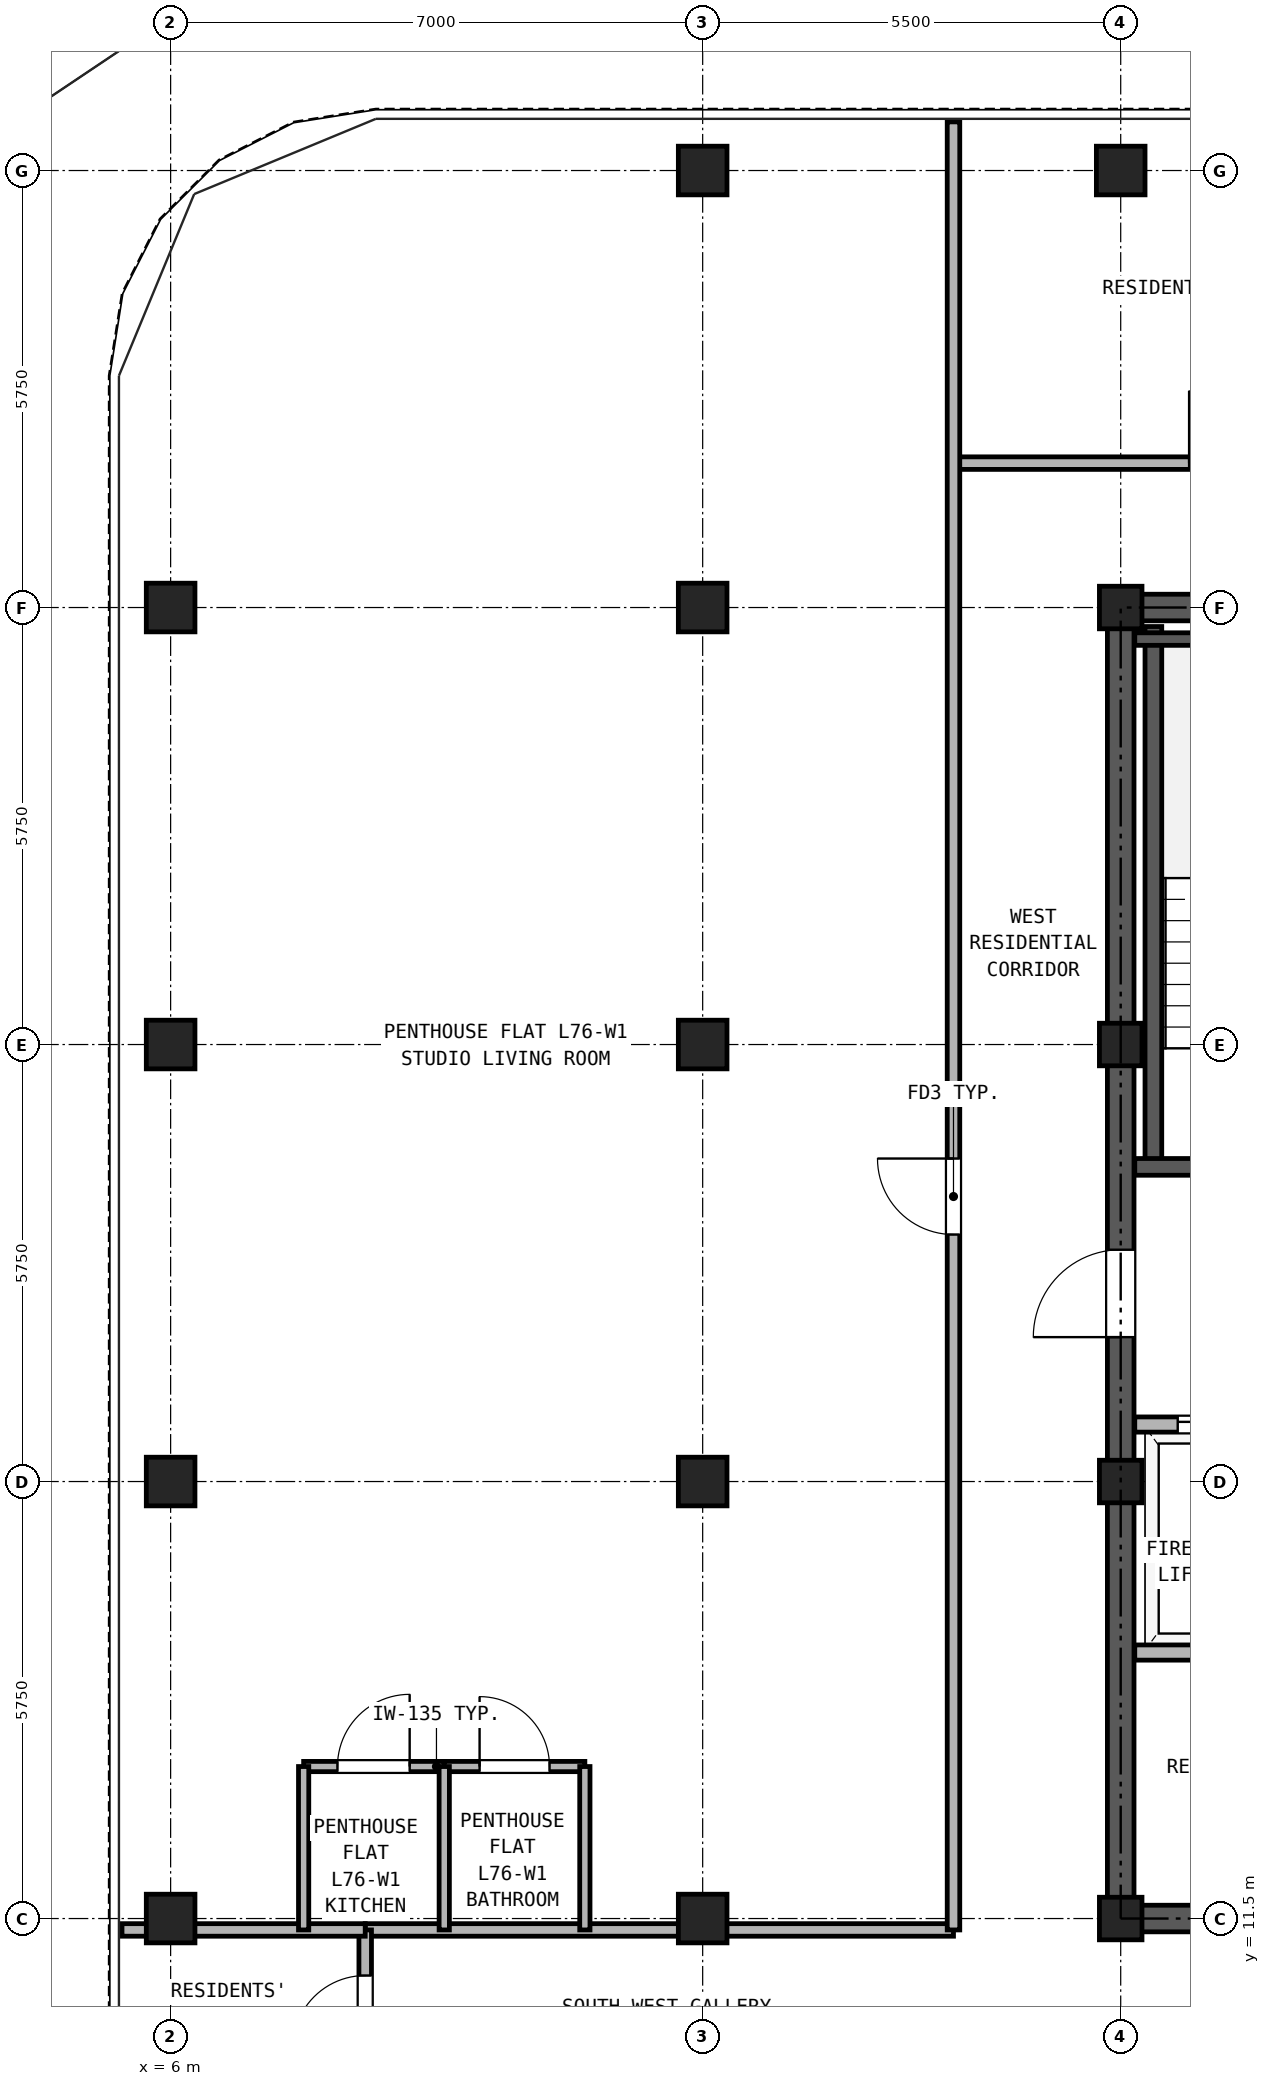
"""IFC4 building model, lengths in metres.
Left out: names, types, materials, properties, quantities, classifications, styles, units other than length and angle.
Written with IfcOpenShell. Run it as: python <this file> out.ifc"""

import sys

from ifc_helpers import new_model, si_unit, direction, frame, frame_2d, origin, origin_2d, place, context, subcontext, project, spatial, rectangle, hollow_rectangle, extrude, source, transform, mapped, element, fill, save


model = new_model("IFC4")
c1 = context("Model", 3, precision=1e-05, world=origin(), true_north=direction((0.0, 1.0)))
c2 = subcontext(c1, "Body", "Model", "MODEL_VIEW")
j1 = project(units=[si_unit("LENGTHUNIT", "METRE"), si_unit("PLANEANGLEUNIT", "RADIAN")], contexts=[c1])
p1 = place(None, origin())
s1 = spatial("IfcSite", under=j1, at=p1, CompositionType="ELEMENT")
p2 = place(p1, origin())
s2 = spatial("IfcBuilding", under=s1, at=p2, CompositionType="ELEMENT")
p3 = place(p2, frame((0.0, 0.0, 264.9)))
s3 = spatial("IfcBuildingStorey", under=s2, at=p3, CompositionType="ELEMENT", Elevation=264.9)
m1 = source(origin(), c2, "Body", "SweptSolid", [
    extrude(hollow_rectangle(XDim=0.64, YDim=0.64, WallThickness=0.035, at=origin_2d()), origin(), (0.0, 0.0, 1.0), 2.98),
])
for number, where, z_axis, x_axis in (
    (1, (13.0, 34.5, 0.0), (0.0, 0.0, 1.0), (1.0, 0.0, 0.0)),
    (2, (18.5, 34.5, 0.0), (0.0, 0.0, 1.0), (1.0, 0.0, 0.0)),
    (3, (6.0, 11.5, 0.0), (0.0, 0.0, 1.0), (1.0, 0.0, 0.0)),
    (4, (6.0, 17.25, 0.0), (0.0, 0.0, 1.0), (1.0, 0.0, 0.0)),
    (5, (6.0, 23.0, 0.0), (0.0, 0.0, 1.0), (1.0, 0.0, 0.0)),
    (6, (6.0, 28.75, 0.0), (0.0, 0.0, 1.0), (1.0, 0.0, 0.0)),
    (7, (13.0, 11.5, 0.0), (0.0, 0.0, 1.0), (1.0, 0.0, 0.0)),
    (8, (13.0, 17.25, 0.0), (0.0, 0.0, 1.0), (1.0, 0.0, 0.0)),
    (9, (13.0, 23.0, 0.0), (0.0, 0.0, 1.0), (1.0, 0.0, 0.0)),
    (10, (13.0, 28.75, 0.0), (0.0, 0.0, 1.0), (1.0, 0.0, 0.0)),
):
    element("IfcColumn", number, at=place(p3, frame(where, z_axis=z_axis, x_axis=x_axis)), inside=s3, PredefinedType="COLUMN", context=c2, shape_type="MappedRepresentation", body=[
        mapped(m1, transform((0.0, 0.0, 0.0), x_axis=(1.0, 0.0, 0.0), y_axis=(0.0, 1.0, 0.0), z_axis=(0.0, 0.0, 1.0), scale=1.0)),
    ])
m2 = source(origin(), c2, "Body", "SweptSolid", [
    extrude(hollow_rectangle(XDim=0.56, YDim=0.56, WallThickness=0.03, at=origin_2d()), origin(), (0.0, 0.0, 1.0), 2.98),
])
for number, where, z_axis, x_axis in (
    (11, (18.5, 11.5, 0.0), (0.0, 0.0, 1.0), (1.0, 0.0, 0.0)),
    (12, (18.5, 17.25, 0.0), (0.0, 0.0, 1.0), (1.0, 0.0, 0.0)),
    (13, (18.5, 23.0, 0.0), (0.0, 0.0, 1.0), (1.0, 0.0, 0.0)),
    (14, (18.5, 28.75, 0.0), (0.0, 0.0, 1.0), (1.0, 0.0, 0.0)),
):
    element("IfcColumn", number, at=place(p3, frame(where, z_axis=z_axis, x_axis=x_axis)), inside=s3, PredefinedType="COLUMN", context=c2, shape_type="MappedRepresentation", body=[
        mapped(m2, transform((0.0, 0.0, 0.0), x_axis=(1.0, 0.0, 0.0), y_axis=(0.0, 1.0, 0.0), z_axis=(0.0, 0.0, 1.0), scale=1.0)),
    ])
p4 = place(p3, frame((18.325, 11.5, 0.0), z_axis=(0.0, 0.0, 1.0), x_axis=(1.0, 0.0, 0.0)))
e15 = element("IfcWall", 15, at=p4, inside=s3, PredefinedType="SHEAR", context=c2, shape_type="SweptSolid", body=[
    extrude(rectangle(XDim=10.35, YDim=0.35, at=frame_2d((5.175, 0.0))), origin(), (0.0, 0.0, 1.0), 2.98),
])
p5 = place(p4, frame((1.775, 0.0, 0.0)))
e16 = element("IfcOpeningElement", 16, at=p5, cuts=e15, PredefinedType="OPENING", context=c2, shape_type="SweptSolid", body=[
    extrude(rectangle(XDim=0.95, YDim=2.15, at=frame_2d((0.475, 1.075))), frame((0.0, 0.185, 0.0), z_axis=(0.0, -1.0, 0.0), x_axis=(1.0, 0.0, 0.0)), (0.0, 0.0, 1.0), 0.37),
])
p6 = place(p4, frame((5.275, 0.0, 0.0)))
e17 = element("IfcOpeningElement", 17, at=p6, cuts=e15, PredefinedType="OPENING", context=c2, shape_type="SweptSolid", body=[
    extrude(rectangle(XDim=0.95, YDim=2.15, at=frame_2d((0.475, 1.075))), frame((0.0, 0.185, 0.0), z_axis=(0.0, -1.0, 0.0), x_axis=(1.0, 0.0, 0.0)), (0.0, 0.0, 1.0), 0.37),
])
p7 = place(p4, frame((8.175, 0.0, 0.0)))
e18 = element("IfcOpeningElement", 18, at=p7, cuts=e15, PredefinedType="OPENING", context=c2, shape_type="SweptSolid", body=[
    extrude(rectangle(XDim=1.1, YDim=2.25, at=frame_2d((0.55, 1.125))), frame((0.0, 0.185, 0.0), z_axis=(0.0, -1.0, 0.0), x_axis=(1.0, 0.0, 0.0)), (0.0, 0.0, 1.0), 0.37),
])
p8 = place(p3, frame((18.325, 28.75, 0.0), z_axis=(0.0, 0.0, 1.0), x_axis=(1.0, 0.0, 0.0)))
e19 = element("IfcWall", 19, at=p8, inside=s3, PredefinedType="SHEAR", context=c2, shape_type="SweptSolid", body=[
    extrude(rectangle(XDim=10.35, YDim=0.35, at=frame_2d((5.175, 0.0))), origin(), (0.0, 0.0, 1.0), 2.98),
])
p9 = place(p8, frame((4.055, 0.0, 0.0)))
e20 = element("IfcOpeningElement", 20, at=p9, cuts=e19, PredefinedType="OPENING", context=c2, shape_type="SweptSolid", body=[
    extrude(rectangle(XDim=0.9, YDim=2.05, at=frame_2d((0.45, 1.025))), frame((0.0, 0.185, 0.0), z_axis=(0.0, -1.0, 0.0), x_axis=(1.0, 0.0, 0.0)), (0.0, 0.0, 1.0), 0.37),
])
p10 = place(p8, frame((5.595, 0.0, 0.0)))
e21 = element("IfcOpeningElement", 21, at=p10, cuts=e19, PredefinedType="OPENING", context=c2, shape_type="SweptSolid", body=[
    extrude(rectangle(XDim=0.9, YDim=2.05, at=frame_2d((0.45, 1.025))), frame((0.0, 0.185, 0.0), z_axis=(0.0, -1.0, 0.0), x_axis=(1.0, 0.0, 0.0)), (0.0, 0.0, 1.0), 0.37),
])
p11 = place(p3, frame((18.5, 11.675, 0.0), z_axis=(0.0, 0.0, 1.0), x_axis=(0.0, 1.0, 0.0)))
e22 = element("IfcWall", 22, at=p11, inside=s3, PredefinedType="SHEAR", context=c2, shape_type="SweptSolid", body=[
    extrude(rectangle(XDim=16.9, YDim=0.35, at=frame_2d((8.45, 0.0))), origin(), (0.0, 0.0, 1.0), 2.98),
])
p12 = place(p11, frame((7.475, 0.0, 0.0)))
e23 = element("IfcOpeningElement", 23, at=p12, cuts=e22, PredefinedType="OPENING", context=c2, shape_type="SweptSolid", body=[
    extrude(rectangle(XDim=1.15, YDim=2.2, at=frame_2d((0.575, 1.1))), frame((0.0, 0.185, 0.0), z_axis=(0.0, -1.0, 0.0), x_axis=(1.0, 0.0, 0.0)), (0.0, 0.0, 1.0), 0.37),
])
p13 = place(p3, frame((18.93, 21.39, 0.0), z_axis=(0.0, 0.0, 1.0), x_axis=(0.0, 1.0, 0.0)))
e24 = element("IfcWall", 24, at=p13, inside=s3, PredefinedType="SOLIDWALL", context=c2, shape_type="SweptSolid", body=[
    extrude(rectangle(XDim=7.11, YDim=0.22, at=frame_2d((3.555, 0.0))), origin(), (0.0, 0.0, 1.0), 2.98),
])
p14 = place(p3, frame((18.685, 28.335, 0.0), z_axis=(0.0, 0.0, 1.0), x_axis=(1.0, 0.0, 0.0)))
e25 = element("IfcWall", 25, at=p14, inside=s3, PredefinedType="PARTITIONING", context=c2, shape_type="SweptSolid", body=[
    extrude(rectangle(XDim=3.425, YDim=0.165, at=frame_2d((1.712, 0.0))), origin(), (0.0, 0.0, 1.0), 2.98),
])
p15 = place(p3, frame((18.685, 21.39, 0.0), z_axis=(0.0, 0.0, 1.0), x_axis=(1.0, 0.0, 0.0)))
e26 = element("IfcWall", 26, at=p15, inside=s3, PredefinedType="SOLIDWALL", context=c2, shape_type="SweptSolid", body=[
    extrude(rectangle(XDim=6.445, YDim=0.22, at=frame_2d((3.222, 0.0))), origin(), (0.0, 0.0, 1.0), 2.98),
])
p16 = place(p15, frame((1.165, 0.0, 0.0)))
e27 = element("IfcOpeningElement", 27, at=p16, cuts=e26, PredefinedType="OPENING", context=c2, shape_type="SweptSolid", body=[
    extrude(rectangle(XDim=1.15, YDim=2.2, at=frame_2d((0.575, 1.1))), frame((0.0, 0.12, 0.0), z_axis=(0.0, -1.0, 0.0), x_axis=(1.0, 0.0, 0.0)), (0.0, 0.0, 1.0), 0.24),
])
p17 = place(p15, frame((4.895, 0.0, 0.0)))
e28 = element("IfcOpeningElement", 28, at=p17, cuts=e26, PredefinedType="OPENING", context=c2, shape_type="SweptSolid", body=[
    extrude(rectangle(XDim=1.1, YDim=2.25, at=frame_2d((0.55, 1.125))), frame((0.0, 0.12, 0.0), z_axis=(0.0, -1.0, 0.0), x_axis=(1.0, 0.0, 0.0)), (0.0, 0.0, 1.0), 0.24),
])
p18 = place(p3, frame((18.685, 18.0, 0.0), z_axis=(0.0, 0.0, 1.0), x_axis=(1.0, 0.0, 0.0)))
e29 = element("IfcWall", 29, at=p18, inside=s3, PredefinedType="PARTITIONING", context=c2, shape_type="SweptSolid", body=[
    extrude(rectangle(XDim=9.63, YDim=0.2, at=frame_2d((4.815, 0.0))), origin(), (0.0, 0.0, 1.0), 2.98),
])
p19 = place(p18, frame((0.565, 0.0, 0.0)))
e30 = element("IfcOpeningElement", 30, at=p19, cuts=e29, PredefinedType="OPENING", context=c2, shape_type="SweptSolid", body=[
    extrude(rectangle(XDim=1.3, YDim=2.3, at=frame_2d((0.65, 1.15))), frame((0.0, 0.11, 0.0), z_axis=(0.0, -1.0, 0.0), x_axis=(1.0, 0.0, 0.0)), (0.0, 0.0, 1.0), 0.22),
])
p20 = place(p18, frame((2.665, 0.0, 0.0)))
e31 = element("IfcOpeningElement", 31, at=p20, cuts=e29, PredefinedType="OPENING", context=c2, shape_type="SweptSolid", body=[
    extrude(rectangle(XDim=1.3, YDim=2.3, at=frame_2d((0.65, 1.15))), frame((0.0, 0.11, 0.0), z_axis=(0.0, -1.0, 0.0), x_axis=(1.0, 0.0, 0.0)), (0.0, 0.0, 1.0), 0.22),
])
p21 = place(p18, frame((5.065, 0.0, 0.0)))
e32 = element("IfcOpeningElement", 32, at=p21, cuts=e29, PredefinedType="OPENING", context=c2, shape_type="SweptSolid", body=[
    extrude(rectangle(XDim=0.9, YDim=2.05, at=frame_2d((0.45, 1.025))), frame((0.0, 0.11, 0.0), z_axis=(0.0, -1.0, 0.0), x_axis=(1.0, 0.0, 0.0)), (0.0, 0.0, 1.0), 0.22),
])
p22 = place(p18, frame((7.765, 0.0, 0.0)))
e33 = element("IfcOpeningElement", 33, at=p22, cuts=e29, PredefinedType="OPENING", context=c2, shape_type="SweptSolid", body=[
    extrude(rectangle(XDim=0.9, YDim=2.05, at=frame_2d((0.45, 1.025))), frame((0.0, 0.11, 0.0), z_axis=(0.0, -1.0, 0.0), x_axis=(1.0, 0.0, 0.0)), (0.0, 0.0, 1.0), 0.22),
])
p23 = place(p3, frame((18.685, 15.0, 0.0), z_axis=(0.0, 0.0, 1.0), x_axis=(1.0, 0.0, 0.0)))
e34 = element("IfcWall", 34, at=p23, inside=s3, PredefinedType="PARTITIONING", context=c2, shape_type="SweptSolid", body=[
    extrude(rectangle(XDim=9.63, YDim=0.2, at=frame_2d((4.815, 0.0))), origin(), (0.0, 0.0, 1.0), 2.98),
])
p24 = place(p3, frame((8.56, 11.35, 0.0), z_axis=(0.0, 0.0, 1.0), x_axis=(1.0, 0.0, 0.0)))
e35 = element("IfcWall", 35, at=p24, inside=s3, PredefinedType="PARTITIONING", context=c2, shape_type="SweptSolid", body=[
    extrude(rectangle(XDim=7.74, YDim=0.165, at=frame_2d((3.87, 0.0))), origin(), (0.0, 0.0, 1.0), 2.428),
])
p25 = place(p3, frame((8.56, 9.35, 0.0), z_axis=(0.0, 0.0, 1.0), x_axis=(0.0, 1.0, 0.0)))
e36 = element("IfcWall", 36, at=p25, inside=s3, PredefinedType="PARTITIONING", context=c2, shape_type="SweptSolid", body=[
    extrude(rectangle(XDim=2.0, YDim=0.165, at=frame_2d((1.0, 0.0))), origin(), (0.0, 0.0, 1.0), 2.98),
])
p26 = place(p25, frame((0.45, 0.0, 0.0)))
e37 = element("IfcOpeningElement", 37, at=p26, cuts=e36, PredefinedType="OPENING", context=c2, shape_type="SweptSolid", body=[
    extrude(rectangle(XDim=0.95, YDim=2.15, at=frame_2d((0.475, 1.075))), frame((0.0, 0.093, 0.0), z_axis=(0.0, -1.0, 0.0), x_axis=(1.0, 0.0, 0.0)), (0.0, 0.0, 1.0), 0.185),
])
p27 = place(p3, frame((16.3, 30.65, 0.0), z_axis=(0.0, 0.0, 1.0), x_axis=(1.0, 0.0, 0.0)))
e38 = element("IfcWall", 38, at=p27, inside=s3, PredefinedType="PARTITIONING", context=c2, shape_type="SweptSolid", body=[
    extrude(rectangle(XDim=14.4, YDim=0.165, at=frame_2d((7.2, 0.0))), origin(), (0.0, 0.0, 1.0), 2.98),
])
p28 = place(p27, frame((3.1, 0.0, 0.0)))
e39 = element("IfcOpeningElement", 39, at=p28, cuts=e38, PredefinedType="OPENING", context=c2, shape_type="SweptSolid", body=[
    extrude(rectangle(XDim=0.95, YDim=2.15, at=frame_2d((0.475, 1.075))), frame((0.0, 0.093, 0.0), z_axis=(0.0, -1.0, 0.0), x_axis=(1.0, 0.0, 0.0)), (0.0, 0.0, 1.0), 0.185),
])
p29 = place(p27, frame((8.0, 0.0, 0.0)))
e40 = element("IfcOpeningElement", 40, at=p29, cuts=e38, PredefinedType="OPENING", context=c2, shape_type="SweptSolid", body=[
    extrude(rectangle(XDim=0.95, YDim=2.15, at=frame_2d((0.475, 1.075))), frame((0.0, 0.093, 0.0), z_axis=(0.0, -1.0, 0.0), x_axis=(1.0, 0.0, 0.0)), (0.0, 0.0, 1.0), 0.185),
])
p30 = place(p27, frame((11.6, 0.0, 0.0)))
e41 = element("IfcOpeningElement", 41, at=p30, cuts=e38, PredefinedType="OPENING", context=c2, shape_type="SweptSolid", body=[
    extrude(rectangle(XDim=0.92, YDim=2.1, at=frame_2d((0.46, 1.05))), frame((0.0, 0.093, 0.0), z_axis=(0.0, -1.0, 0.0), x_axis=(1.0, 0.0, 0.0)), (0.0, 0.0, 1.0), 0.185),
])
p31 = place(p3, frame((16.3, 11.35, 0.0), z_axis=(0.0, 0.0, 1.0), x_axis=(0.0, 1.0, 0.0)))
e42 = element("IfcWall", 42, at=p31, inside=s3, PredefinedType="PARTITIONING", context=c2, shape_type="SweptSolid", body=[
    extrude(rectangle(XDim=23.79, YDim=0.165, at=frame_2d((11.895, 0.0))), origin(), (0.0, 0.0, 1.0), 2.98),
])
p32 = place(p31, frame((9.15, 0.0, 0.0)))
e43 = element("IfcOpeningElement", 43, at=p32, cuts=e42, PredefinedType="OPENING", context=c2, shape_type="SweptSolid", body=[
    extrude(rectangle(XDim=1.0, YDim=2.15, at=frame_2d((0.5, 1.075))), frame((0.0, 0.093, 0.0), z_axis=(0.0, -1.0, 0.0), x_axis=(1.0, 0.0, 0.0)), (0.0, 0.0, 1.0), 0.185),
])
p33 = place(p3, frame((5.36, 11.35, 0.0), z_axis=(0.0, 0.0, 1.0), x_axis=(1.0, 0.0, 0.0)))
e44 = element("IfcWall", 44, at=p33, inside=s3, PredefinedType="PARTITIONING", context=c2, shape_type="SweptSolid", body=[
    extrude(rectangle(XDim=3.2, YDim=0.165, at=frame_2d((1.6, 0.0))), origin(), (0.0, 0.0, 1.0), 2.428),
])
p34 = place(p3, frame((7.75, 13.5, 0.0), z_axis=(0.0, 0.0, 1.0), x_axis=(1.0, 0.0, 0.0)))
e45 = element("IfcWall", 45, at=p34, inside=s3, PredefinedType="PARTITIONING", context=c2, shape_type="SweptSolid", body=[
    extrude(rectangle(XDim=1.85, YDim=0.135, at=frame_2d((0.925, 0.0))), origin(), (0.0, 0.0, 1.0), 2.98),
])
p35 = place(p34, frame((0.445, 0.0, 0.0)))
e46 = element("IfcOpeningElement", 46, at=p35, cuts=e45, PredefinedType="OPENING", context=c2, shape_type="SweptSolid", body=[
    extrude(rectangle(XDim=0.95, YDim=2.15, at=frame_2d((0.475, 1.075))), frame((0.0, 0.077, 0.0), z_axis=(0.0, -1.0, 0.0), x_axis=(1.0, 0.0, 0.0)), (0.0, 0.0, 1.0), 0.155),
])
p36 = place(p3, frame((9.6, 13.5, 0.0), z_axis=(0.0, 0.0, 1.0), x_axis=(1.0, 0.0, 0.0)))
e47 = element("IfcWall", 47, at=p36, inside=s3, PredefinedType="PARTITIONING", context=c2, shape_type="SweptSolid", body=[
    extrude(rectangle(XDim=1.85, YDim=0.135, at=frame_2d((0.925, 0.0))), origin(), (0.0, 0.0, 1.0), 2.98),
])
p37 = place(p36, frame((0.465, 0.0, 0.0)))
e48 = element("IfcOpeningElement", 48, at=p37, cuts=e47, PredefinedType="OPENING", context=c2, shape_type="SweptSolid", body=[
    extrude(rectangle(XDim=0.92, YDim=2.1, at=frame_2d((0.46, 1.05))), frame((0.0, 0.077, 0.0), z_axis=(0.0, -1.0, 0.0), x_axis=(1.0, 0.0, 0.0)), (0.0, 0.0, 1.0), 0.155),
])
for number, where, z_axis, x_axis in (
    (49, (7.75, 11.35, 0.0), (0.0, 0.0, 1.0), (0.0, 1.0, 0.0)),
    (50, (9.6, 11.35, 0.0), (0.0, 0.0, 1.0), (0.0, 1.0, 0.0)),
    (51, (11.45, 11.35, 0.0), (0.0, 0.0, 1.0), (0.0, 1.0, 0.0)),
):
    element("IfcWall", number, at=place(p3, frame(where, z_axis=z_axis, x_axis=x_axis)), inside=s3, PredefinedType="PARTITIONING", context=c2, shape_type="SweptSolid", body=[
        extrude(rectangle(XDim=2.15, YDim=0.135, at=frame_2d((1.075, 0.0))), origin(), (0.0, 0.0, 1.0), 2.98),
    ])
p38 = place(p19, origin())
e52 = element("IfcDoor", 52, at=p38, inside=s3, OperationType="DOUBLE_DOOR_SLIDING", PredefinedType="DOOR", context=c2, shape_type="SweptSolid", body=[
    extrude(rectangle(XDim=1.3, YDim=2.3, at=frame_2d((0.65, 1.15))), frame((0.0, 0.025, 0.0), z_axis=(0.0, -1.0, 0.0), x_axis=(1.0, 0.0, 0.0)), (0.0, 0.0, 1.0), 0.05),
])
fill(e30, e52)
p39 = place(p12, frame((1.15, 0.0, 0.0), z_axis=(0.0, 0.0, 1.0), x_axis=(-1.0, 0.0, 0.0)))
e53 = element("IfcDoor", 53, at=p39, inside=s3, OperationType="SINGLE_SWING_LEFT", PredefinedType="DOOR", context=c2, shape_type="SweptSolid", body=[
    extrude(rectangle(XDim=1.15, YDim=2.2, at=frame_2d((0.575, 1.1))), frame((0.0, 0.025, 0.0), z_axis=(0.0, -1.0, 0.0), x_axis=(1.0, 0.0, 0.0)), (0.0, 0.0, 1.0), 0.05),
])
fill(e23, e53)
p40 = place(p26, frame((0.95, 0.0, 0.0), z_axis=(0.0, 0.0, 1.0), x_axis=(-1.0, 0.0, 0.0)))
e54 = element("IfcDoor", 54, at=p40, inside=s3, OperationType="SINGLE_SWING_LEFT", PredefinedType="DOOR", context=c2, shape_type="SweptSolid", body=[
    extrude(rectangle(XDim=0.95, YDim=2.15, at=frame_2d((0.475, 1.075))), frame((0.0, 0.025, 0.0), z_axis=(0.0, -1.0, 0.0), x_axis=(1.0, 0.0, 0.0)), (0.0, 0.0, 1.0), 0.05),
])
fill(e37, e54)
p41 = place(p35, origin())
e55 = element("IfcDoor", 55, at=p41, inside=s3, OperationType="SINGLE_SWING_RIGHT", PredefinedType="DOOR", context=c2, shape_type="SweptSolid", body=[
    extrude(rectangle(XDim=0.95, YDim=2.15, at=frame_2d((0.475, 1.075))), frame((0.0, 0.025, 0.0), z_axis=(0.0, -1.0, 0.0), x_axis=(1.0, 0.0, 0.0)), (0.0, 0.0, 1.0), 0.05),
])
fill(e46, e55)
p42 = place(p37, origin())
e56 = element("IfcDoor", 56, at=p42, inside=s3, OperationType="SINGLE_SWING_LEFT", PredefinedType="DOOR", context=c2, shape_type="SweptSolid", body=[
    extrude(rectangle(XDim=0.92, YDim=2.1, at=frame_2d((0.46, 1.05))), frame((0.0, 0.025, 0.0), z_axis=(0.0, -1.0, 0.0), x_axis=(1.0, 0.0, 0.0)), (0.0, 0.0, 1.0), 0.05),
])
fill(e48, e56)
p43 = place(p32, origin())
e57 = element("IfcDoor", 57, at=p43, inside=s3, OperationType="SINGLE_SWING_RIGHT", PredefinedType="DOOR", context=c2, shape_type="SweptSolid", body=[
    extrude(rectangle(XDim=1.0, YDim=2.15, at=frame_2d((0.5, 1.075))), frame((0.0, 0.025, 0.0), z_axis=(0.0, -1.0, 0.0), x_axis=(1.0, 0.0, 0.0)), (0.0, 0.0, 1.0), 0.05),
])
fill(e43, e57)
p44 = place(p28, origin())
e58 = element("IfcDoor", 58, at=p44, inside=s3, OperationType="SINGLE_SWING_LEFT", PredefinedType="DOOR", context=c2, shape_type="SweptSolid", body=[
    extrude(rectangle(XDim=0.95, YDim=2.15, at=frame_2d((0.475, 1.075))), frame((0.0, 0.025, 0.0), z_axis=(0.0, -1.0, 0.0), x_axis=(1.0, 0.0, 0.0)), (0.0, 0.0, 1.0), 0.05),
])
fill(e39, e58)
save(model, sys.argv[1])
